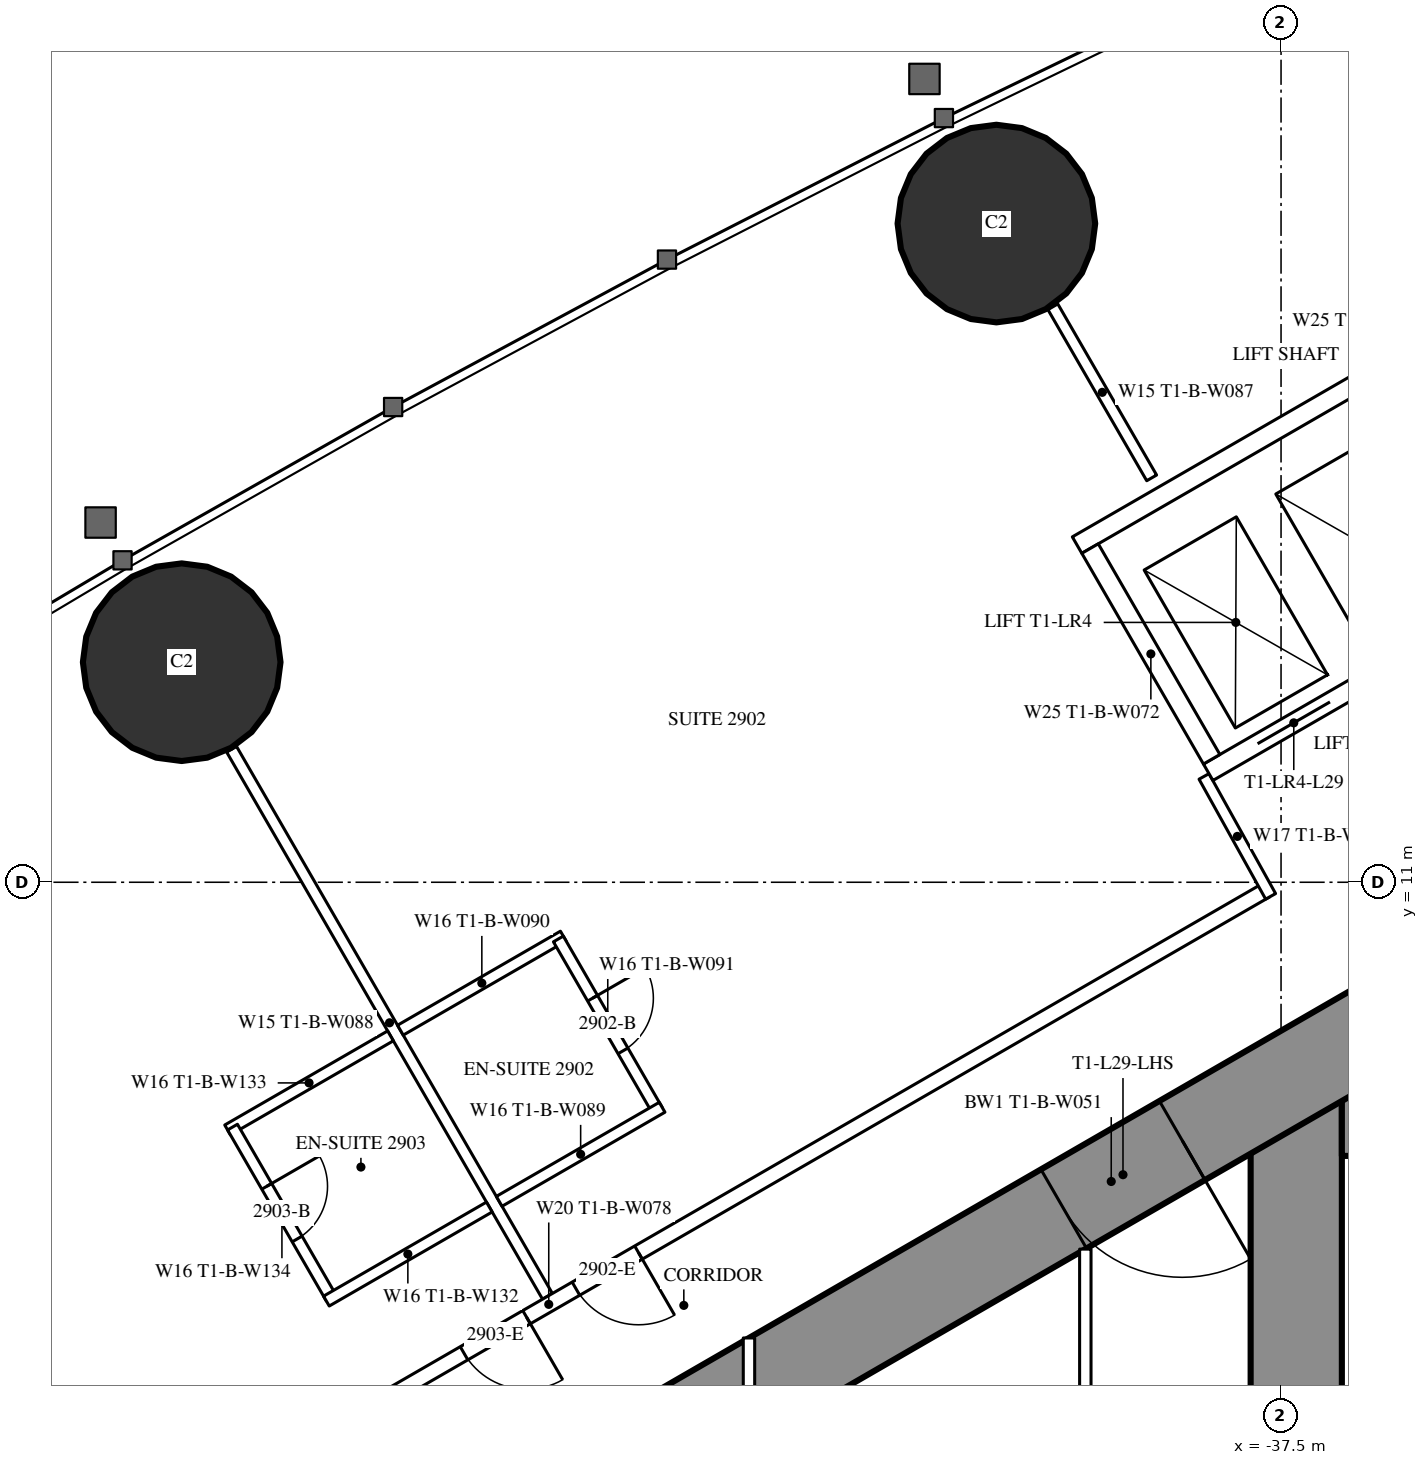
"""IFC4 building model, lengths in metres.
Left out: names, types, materials, properties, quantities, classifications, styles, units other than length and angle.
Written with IfcOpenShell. Run it as: python <this file> out.ifc"""

import sys

from ifc_helpers import new_model, si_unit, direction, frame, frame_2d, origin, origin_2d, place, context, subcontext, project, spatial, rectangle, hollow_circle, extrude, element, fill, save


model = new_model("IFC4")
c1 = context("Model", 3, precision=1e-05, world=origin(), true_north=direction((0.0, 1.0)))
c2 = subcontext(c1, "Body", "Model", "MODEL_VIEW")
j1 = project(units=[si_unit("LENGTHUNIT", "METRE"), si_unit("PLANEANGLEUNIT", "RADIAN")], contexts=[c1])
p1 = place(None, origin())
s1 = spatial("IfcSite", under=j1, at=p1, CompositionType="ELEMENT")
p2 = place(p1, origin())
s2 = spatial("IfcBuilding", under=s1, at=p2, CompositionType="ELEMENT")
p3 = place(p2, frame((0.0, 0.0, 111.6)))
s3 = spatial("IfcBuildingStorey", under=s2, at=p3, CompositionType="ELEMENT", Elevation=111.6)
for number, where, z_axis, x_axis in (
    (1, (-41.245, 19.666, 0.0), (0.0, 0.0, 1.0), (1.0, 0.0, 0.0)),
    (2, (-51.963, 13.895, 0.0), (0.0, 0.0, 1.0), (1.0, 0.0, 0.0)),
):
    element("IfcColumn", number, at=place(p3, frame(where, z_axis=z_axis, x_axis=x_axis)), inside=s3, PredefinedType="COLUMN", context=c2, shape_type="SweptSolid", body=[
        extrude(hollow_circle(Radius=1.3, WallThickness=0.1, at=origin_2d()), origin(), (0.0, 0.0, 1.0), 3.5),
    ])
p4 = place(p3, frame((-37.3, 8.6, 0.0), z_axis=(0.0, 0.0, 1.0), x_axis=(0.0, -1.0, 0.0)))
e3 = element("IfcWall", 3, at=p4, inside=s3, PredefinedType="SHEAR", context=c2, shape_type="SweptSolid", body=[
    extrude(rectangle(XDim=17.2, YDim=1.2, at=frame_2d((8.6, 0.0))), origin(), (0.0, 0.0, 1.0), 3.5),
])
p5 = place(p4, frame((7.7, 0.0, 0.0)))
e4 = element("IfcOpeningElement", 4, at=p5, cuts=e3, PredefinedType="OPENING", context=c2, shape_type="SweptSolid", body=[
    extrude(rectangle(XDim=1.8, YDim=2.2, at=frame_2d((0.9, 1.1))), frame((0.0, 0.61, 0.0), z_axis=(0.0, -1.0, 0.0), x_axis=(1.0, 0.0, 0.0)), (0.0, 0.0, 1.0), 1.22),
])
p6 = place(p3, frame((-28.3, 8.0, 0.0), z_axis=(0.0, 0.0, 1.0), x_axis=(-1.0, 0.0, 0.0)))
e5 = element("IfcWall", 5, at=p6, inside=s3, PredefinedType="SHEAR", context=c2, shape_type="SweptSolid", body=[
    extrude(rectangle(XDim=8.4, YDim=1.2, at=frame_2d((4.2, 0.0))), origin(), (0.0, 0.0, 1.0), 3.5),
])
p7 = place(p6, frame((0.25, 0.0, 0.0)))
e6 = element("IfcOpeningElement", 6, at=p7, cuts=e5, PredefinedType="OPENING", context=c2, shape_type="SweptSolid", body=[
    extrude(rectangle(XDim=1.0, YDim=2.2, at=frame_2d((0.5, 1.1))), frame((0.0, 0.61, 0.0), z_axis=(0.0, -1.0, 0.0), x_axis=(1.0, 0.0, 0.0)), (0.0, 0.0, 1.0), 1.22),
])
p8 = place(p3, frame((-27.2, 14.3, 0.0), z_axis=(0.0, 0.0, 1.0), x_axis=(-0.866026593062, -0.499997940104, 0.0)))
e7 = element("IfcWall", 7, at=p8, inside=s3, PredefinedType="SHEAR", context=c2, shape_type="SweptSolid", body=[
    extrude(rectangle(XDim=28.946, YDim=1.2, at=frame_2d((14.473, 0.0))), origin(), (0.0, 0.0, 1.0), 3.5),
])
p9 = place(p8, frame((4.6, 0.0, 0.0)))
e8 = element("IfcOpeningElement", 8, at=p9, cuts=e7, PredefinedType="OPENING", context=c2, shape_type="SweptSolid", body=[
    extrude(rectangle(XDim=1.0, YDim=2.2, at=frame_2d((0.5, 1.1))), frame((0.0, 0.61, 0.0), z_axis=(0.0, -1.0, 0.0), x_axis=(1.0, 0.0, 0.0)), (0.0, 0.0, 1.0), 1.22),
])
p10 = place(p8, frame((13.395, 0.0, 0.0)))
e9 = element("IfcOpeningElement", 9, at=p10, cuts=e7, PredefinedType="OPENING", context=c2, shape_type="SweptSolid", body=[
    extrude(rectangle(XDim=1.8, YDim=2.2, at=frame_2d((0.9, 1.1))), frame((0.0, 0.61, 0.0), z_axis=(0.0, -1.0, 0.0), x_axis=(1.0, 0.0, 0.0)), (0.0, 0.0, 1.0), 1.22),
])
p11 = place(p3, frame((-47.151, 5.552, 0.0), z_axis=(0.0, 0.0, 1.0), x_axis=(-0.500003012045, 0.866023664773, 0.0)))
e10 = element("IfcWall", 10, at=p11, inside=s3, PredefinedType="PARTITIONING", context=c2, shape_type="SweptSolid", body=[
    extrude(rectangle(XDim=8.311, YDim=0.15, at=frame_2d((4.156, 0.0))), origin(), (0.0, 0.0, 1.0), 2.2),
])
p12 = place(p3, frame((-39.202, 16.32, 0.0), z_axis=(0.0, 0.0, 1.0), x_axis=(-0.499947391036, 0.866055775454, 0.0)))
e11 = element("IfcWall", 11, at=p12, inside=s3, PredefinedType="PARTITIONING", context=c2, shape_type="SweptSolid", body=[
    extrude(rectangle(XDim=2.599, YDim=0.15, at=frame_2d((1.3, 0.0))), origin(), (0.0, 0.0, 1.0), 3.25),
])
p13 = place(p3, frame((-37.7, 10.894, 0.0), z_axis=(0.0, 0.0, 1.0), x_axis=(-0.866027905338, -0.499995667157, 0.0)))
e12 = element("IfcWall", 12, at=p13, inside=s3, PredefinedType="PARTITIONING", context=c2, shape_type="SweptSolid", body=[
    extrude(rectangle(XDim=21.787, YDim=0.2, at=frame_2d((10.894, 0.0))), origin(), (0.0, 0.0, 1.0), 3.25),
])
p14 = place(p13, frame((11.23, 0.0, 0.0)))
e13 = element("IfcOpeningElement", 13, at=p14, cuts=e12, PredefinedType="OPENING", context=c2, shape_type="SweptSolid", body=[
    extrude(rectangle(XDim=0.95, YDim=2.2, at=frame_2d((0.475, 1.1))), frame((0.0, 0.11, 0.0), z_axis=(0.0, -1.0, 0.0), x_axis=(1.0, 0.0, 0.0)), (0.0, 0.0, 1.0), 0.22),
])
p15 = place(p13, frame((9.531, 0.0, 0.0)))
e14 = element("IfcOpeningElement", 14, at=p15, cuts=e12, PredefinedType="OPENING", context=c2, shape_type="SweptSolid", body=[
    extrude(rectangle(XDim=0.95, YDim=2.2, at=frame_2d((0.475, 1.1))), frame((0.0, 0.11, 0.0), z_axis=(0.0, -1.0, 0.0), x_axis=(1.0, 0.0, 0.0)), (0.0, 0.0, 1.0), 0.22),
])
p16 = place(p3, frame((-38.513, 12.392, 0.0), z_axis=(0.0, 0.0, 1.0), x_axis=(0.485585508183, -0.874189175317, 0.0)))
e15 = element("IfcWall", 15, at=p16, inside=s3, PredefinedType="PARTITIONING", context=c2, shape_type="SweptSolid", body=[
    extrude(rectangle(XDim=1.805, YDim=0.15, at=frame_2d((0.902, 0.0))), origin(), (0.0, 0.0, 1.0), 3.25),
])
p17 = place(p3, frame((-49.216, 8.979, 0.0), z_axis=(0.0, 0.0, 1.0), x_axis=(-0.866031185235, -0.4999899861, 0.0)))
e16 = element("IfcWall", 16, at=p17, inside=s3, PredefinedType="PARTITIONING", context=c2, shape_type="SweptSolid", body=[
    extrude(rectangle(XDim=2.475, YDim=0.15, at=frame_2d((1.238, 0.0))), origin(), (0.0, 0.0, 1.0), 3.25),
])
p18 = place(p3, frame((-49.995, 5.527, 0.0), z_axis=(0.0, 0.0, 1.0), x_axis=(-0.500006934395, 0.866021400173, 0.0)))
e17 = element("IfcWall", 17, at=p18, inside=s3, PredefinedType="PARTITIONING", context=c2, shape_type="SweptSolid", body=[
    extrude(rectangle(XDim=2.6, YDim=0.15, at=frame_2d((1.3, 0.0))), origin(), (0.0, 0.0, 1.0), 3.25),
])
p19 = place(p18, frame((0.9, 0.0, 0.0)))
e18 = element("IfcOpeningElement", 18, at=p19, cuts=e17, PredefinedType="OPENING", context=c2, shape_type="SweptSolid", body=[
    extrude(rectangle(XDim=0.8, YDim=2.2, at=frame_2d((0.4, 1.1))), frame((0.0, 0.085, 0.0), z_axis=(0.0, -1.0, 0.0), x_axis=(1.0, 0.0, 0.0)), (0.0, 0.0, 1.0), 0.17),
])
p20 = place(p3, frame((-47.916, 6.727, 0.0), z_axis=(0.0, 0.0, 1.0), x_axis=(-0.866031185235, -0.4999899861, 0.0)))
e19 = element("IfcWall", 19, at=p20, inside=s3, PredefinedType="PARTITIONING", context=c2, shape_type="SweptSolid", body=[
    extrude(rectangle(XDim=2.475, YDim=0.15, at=frame_2d((1.238, 0.0))), origin(), (0.0, 0.0, 1.0), 3.25),
])
p21 = place(p3, frame((-46.943, 10.292, 0.0), z_axis=(0.0, 0.0, 1.0), x_axis=(-0.866006523861, -0.500032699561, 0.0)))
e20 = element("IfcWall", 20, at=p21, inside=s3, PredefinedType="PARTITIONING", context=c2, shape_type="SweptSolid", body=[
    extrude(rectangle(XDim=2.475, YDim=0.15, at=frame_2d((1.237, 0.0))), origin(), (0.0, 0.0, 1.0), 3.25),
])
p22 = place(p3, frame((-45.708, 8.002, 0.0), z_axis=(0.0, 0.0, 1.0), x_axis=(-0.500047596559, 0.865997922154, 0.0)))
e21 = element("IfcWall", 21, at=p22, inside=s3, PredefinedType="PARTITIONING", context=c2, shape_type="SweptSolid", body=[
    extrude(rectangle(XDim=2.6, YDim=0.15, at=frame_2d((1.3, 0.0))), origin(), (0.0, 0.0, 1.0), 3.25),
])
p23 = place(p22, frame((0.9, 0.0, 0.0)))
e22 = element("IfcOpeningElement", 22, at=p23, cuts=e21, PredefinedType="OPENING", context=c2, shape_type="SweptSolid", body=[
    extrude(rectangle(XDim=0.8, YDim=2.2, at=frame_2d((0.4, 1.1))), frame((0.0, 0.085, 0.0), z_axis=(0.0, -1.0, 0.0), x_axis=(1.0, 0.0, 0.0)), (0.0, 0.0, 1.0), 0.17),
])
p24 = place(p3, frame((-45.643, 8.04, 0.0), z_axis=(0.0, 0.0, 1.0), x_axis=(-0.866006523861, -0.500032699561, 0.0)))
e23 = element("IfcWall", 23, at=p24, inside=s3, PredefinedType="PARTITIONING", context=c2, shape_type="SweptSolid", body=[
    extrude(rectangle(XDim=2.475, YDim=0.15, at=frame_2d((1.237, 0.0))), origin(), (0.0, 0.0, 1.0), 3.25),
])
p25 = place(p3, frame((-40.075, 6.174, 0.0), z_axis=(0.0, 0.0, 1.0), x_axis=(0.0, -1.0, 0.0)))
e24 = element("IfcWall", 24, at=p25, inside=s3, PredefinedType="PARTITIONING", context=c2, shape_type="SweptSolid", body=[
    extrude(rectangle(XDim=7.374, YDim=0.15, at=frame_2d((3.687, 0.0))), origin(), (0.0, 0.0, 1.0), 3.25),
])
p26 = place(p25, frame((2.787, 0.0, 0.0)))
e25 = element("IfcOpeningElement", 25, at=p26, cuts=e24, PredefinedType="OPENING", context=c2, shape_type="SweptSolid", body=[
    extrude(rectangle(XDim=1.8, YDim=2.2, at=frame_2d((0.9, 1.1))), frame((0.0, 0.085, 0.0), z_axis=(0.0, -1.0, 0.0), x_axis=(1.0, 0.0, 0.0)), (0.0, 0.0, 1.0), 0.17),
])
p27 = place(p3, frame((-44.5, 5.005, 0.0), z_axis=(0.0, 0.0, 1.0), x_axis=(0.0, -1.0, 0.0)))
e26 = element("IfcWall", 26, at=p27, inside=s3, PredefinedType="PARTITIONING", context=c2, shape_type="SweptSolid", body=[
    extrude(rectangle(XDim=10.009, YDim=0.15, at=frame_2d((5.005, 0.0))), origin(), (0.0, 0.0, 1.0), 2.45),
])
p28 = place(p27, frame((2.002, 0.0, 0.0)))
e27 = element("IfcOpeningElement", 27, at=p28, cuts=e26, PredefinedType="OPENING", context=c2, shape_type="SweptSolid", body=[
    extrude(rectangle(XDim=1.0, YDim=2.2, at=frame_2d((0.5, 1.1))), frame((0.0, 0.085, 0.0), z_axis=(0.0, -1.0, 0.0), x_axis=(1.0, 0.0, 0.0)), (0.0, 0.0, 1.0), 0.17),
])
p29 = place(p27, frame((7.007, 0.0, 0.0)))
e28 = element("IfcOpeningElement", 28, at=p29, cuts=e26, PredefinedType="OPENING", context=c2, shape_type="SweptSolid", body=[
    extrude(rectangle(XDim=1.0, YDim=2.2, at=frame_2d((0.5, 1.1))), frame((0.0, 0.085, 0.0), z_axis=(0.0, -1.0, 0.0), x_axis=(1.0, 0.0, 0.0)), (0.0, 0.0, 1.0), 0.17),
])
p30 = place(p3, frame((-31.01, 16.747, 0.0), z_axis=(0.0, 0.0, 1.0), x_axis=(-0.866028165386, -0.499995216735, 0.0)))
e29 = element("IfcWall", 29, at=p30, inside=s3, PredefinedType="PARTITIONING", context=c2, shape_type="SweptSolid", body=[
    extrude(rectangle(XDim=8.6, YDim=0.25, at=frame_2d((4.3, 0.0))), origin(), (0.0, 0.0, 1.0), 3.25),
])
p31 = place(p30, frame((0.75, 0.0, 0.0)))
e30 = element("IfcOpeningElement", 30, at=p31, cuts=e29, PredefinedType="OPENING", context=c2, shape_type="SweptSolid", body=[
    extrude(rectangle(XDim=1.1, YDim=2.2, at=frame_2d((0.55, 1.1))), frame((0.0, 0.135, 0.0), z_axis=(0.0, -1.0, 0.0), x_axis=(1.0, 0.0, 0.0)), (0.0, 0.0, 1.0), 0.27),
])
p32 = place(p30, frame((2.75, 0.0, 0.0)))
e31 = element("IfcOpeningElement", 31, at=p32, cuts=e29, PredefinedType="OPENING", context=c2, shape_type="SweptSolid", body=[
    extrude(rectangle(XDim=1.1, YDim=2.2, at=frame_2d((0.55, 1.1))), frame((0.0, 0.135, 0.0), z_axis=(0.0, -1.0, 0.0), x_axis=(1.0, 0.0, 0.0)), (0.0, 0.0, 1.0), 0.27),
])
p33 = place(p30, frame((4.75, 0.0, 0.0)))
e32 = element("IfcOpeningElement", 32, at=p33, cuts=e29, PredefinedType="OPENING", context=c2, shape_type="SweptSolid", body=[
    extrude(rectangle(XDim=1.1, YDim=2.2, at=frame_2d((0.55, 1.1))), frame((0.0, 0.135, 0.0), z_axis=(0.0, -1.0, 0.0), x_axis=(1.0, 0.0, 0.0)), (0.0, 0.0, 1.0), 0.27),
])
p34 = place(p30, frame((6.75, 0.0, 0.0)))
e33 = element("IfcOpeningElement", 33, at=p34, cuts=e29, PredefinedType="OPENING", context=c2, shape_type="SweptSolid", body=[
    extrude(rectangle(XDim=1.1, YDim=2.2, at=frame_2d((0.55, 1.1))), frame((0.0, 0.135, 0.0), z_axis=(0.0, -1.0, 0.0), x_axis=(1.0, 0.0, 0.0)), (0.0, 0.0, 1.0), 0.27),
])
p35 = place(p3, frame((-32.736, 19.736, 0.0), z_axis=(0.0, 0.0, 1.0), x_axis=(-0.866028165386, -0.499995216735, 0.0)))
e34 = element("IfcWall", 34, at=p35, inside=s3, PredefinedType="PARTITIONING", context=c2, shape_type="SweptSolid", body=[
    extrude(rectangle(XDim=8.6, YDim=0.25, at=frame_2d((4.3, 0.0))), origin(), (0.0, 0.0, 1.0), 3.25),
])
p36 = place(p3, frame((-38.413, 12.618, 0.0), z_axis=(0.0, 0.0, 1.0), x_axis=(-0.499872130319, 0.866099216793, 0.0)))
e35 = element("IfcWall", 35, at=p36, inside=s3, PredefinedType="PARTITIONING", context=c2, shape_type="SweptSolid", body=[
    extrude(rectangle(XDim=3.2, YDim=0.25, at=frame_2d((1.6, 0.0))), origin(), (0.0, 0.0, 1.0), 3.25),
])
p37 = place(p19, origin())
e36 = element("IfcDoor", 36, at=p37, inside=s3, OperationType="SINGLE_SWING_RIGHT", PredefinedType="DOOR", context=c2, shape_type="SweptSolid", body=[
    extrude(rectangle(XDim=0.8, YDim=2.2, at=frame_2d((0.4, 1.1))), frame((0.0, 0.025, 0.0), z_axis=(0.0, -1.0, 0.0), x_axis=(1.0, 0.0, 0.0)), (0.0, 0.0, 1.0), 0.05),
])
fill(e18, e36)
p38 = place(p14, origin())
e37 = element("IfcDoor", 37, at=p38, inside=s3, OperationType="SINGLE_SWING_LEFT", PredefinedType="DOOR", context=c2, shape_type="SweptSolid", body=[
    extrude(rectangle(XDim=0.95, YDim=2.2, at=frame_2d((0.475, 1.1))), frame((0.0, 0.025, 0.0), z_axis=(0.0, -1.0, 0.0), x_axis=(1.0, 0.0, 0.0)), (0.0, 0.0, 1.0), 0.05),
])
fill(e13, e37)
p39 = place(p23, origin())
e38 = element("IfcDoor", 38, at=p39, inside=s3, OperationType="SINGLE_SWING_RIGHT", PredefinedType="DOOR", context=c2, shape_type="SweptSolid", body=[
    extrude(rectangle(XDim=0.8, YDim=2.2, at=frame_2d((0.4, 1.1))), frame((0.0, 0.025, 0.0), z_axis=(0.0, -1.0, 0.0), x_axis=(1.0, 0.0, 0.0)), (0.0, 0.0, 1.0), 0.05),
])
fill(e22, e38)
p40 = place(p15, origin())
e39 = element("IfcDoor", 39, at=p40, inside=s3, OperationType="SINGLE_SWING_LEFT", PredefinedType="DOOR", context=c2, shape_type="SweptSolid", body=[
    extrude(rectangle(XDim=0.95, YDim=2.2, at=frame_2d((0.475, 1.1))), frame((0.0, 0.025, 0.0), z_axis=(0.0, -1.0, 0.0), x_axis=(1.0, 0.0, 0.0)), (0.0, 0.0, 1.0), 0.05),
])
fill(e14, e39)
p41 = place(p10, origin())
e40 = element("IfcDoor", 40, at=p41, inside=s3, OperationType="DOUBLE_DOOR_SINGLE_SWING", PredefinedType="DOOR", context=c2, shape_type="SweptSolid", body=[
    extrude(rectangle(XDim=1.8, YDim=2.2, at=frame_2d((0.9, 1.1))), frame((0.0, 0.025, 0.0), z_axis=(0.0, -1.0, 0.0), x_axis=(1.0, 0.0, 0.0)), (0.0, 0.0, 1.0), 0.05),
])
fill(e9, e40)
p42 = place(p34, origin())
e41 = element("IfcDoor", 41, at=p42, inside=s3, OperationType="DOUBLE_DOOR_SLIDING", PredefinedType="USERDEFINED", context=c2, shape_type="SweptSolid", body=[
    extrude(rectangle(XDim=1.1, YDim=2.2, at=frame_2d((0.55, 1.1))), frame((0.0, 0.025, 0.0), z_axis=(0.0, -1.0, 0.0), x_axis=(1.0, 0.0, 0.0)), (0.0, 0.0, 1.0), 0.05),
])
fill(e33, e41)
save(model, sys.argv[1])
